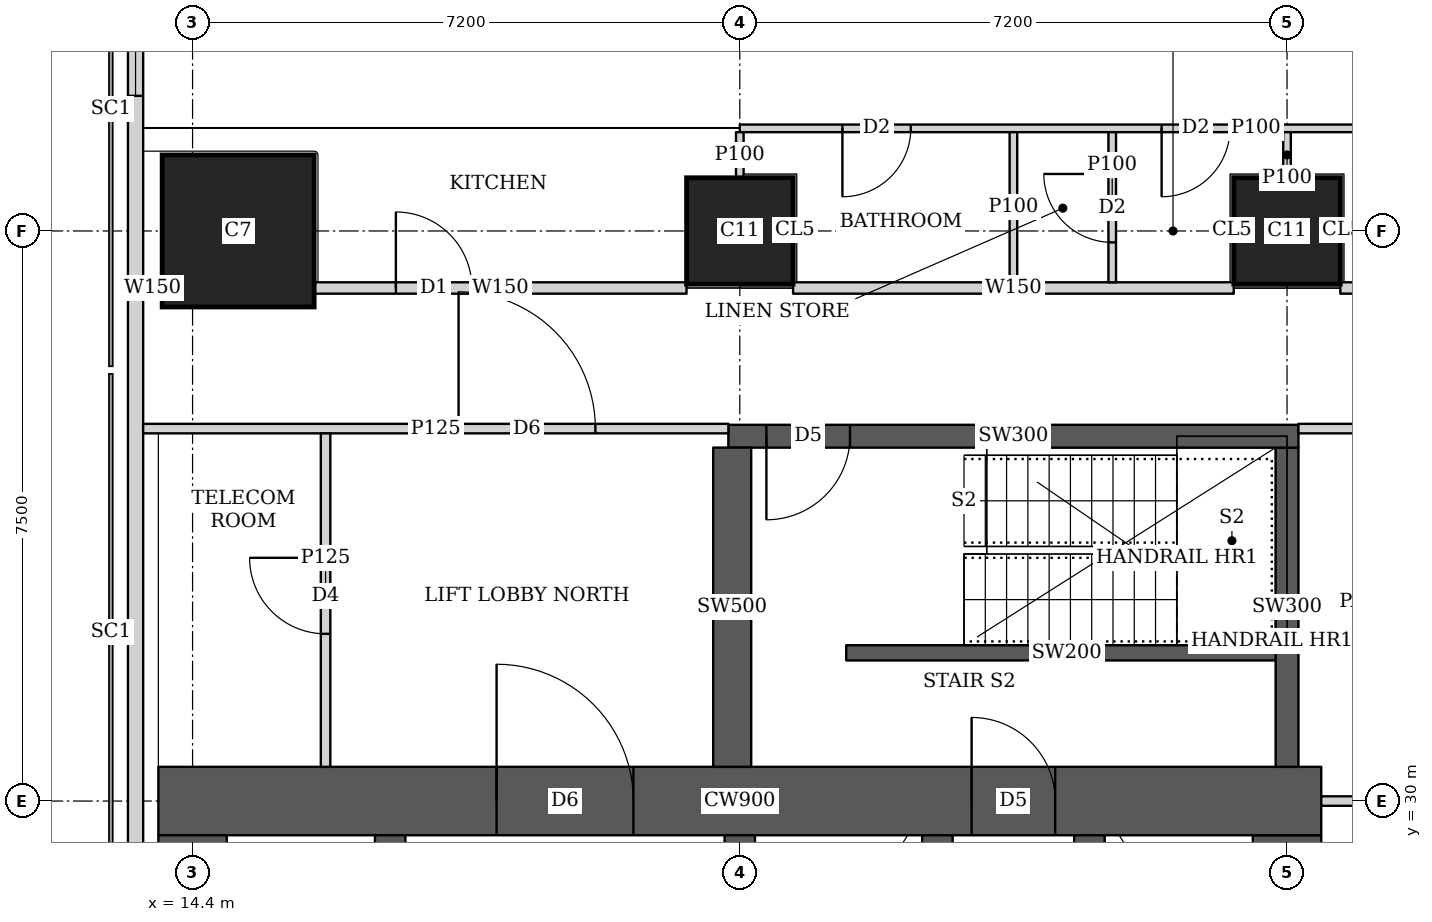
"""IFC4 building model, lengths in metres.
Left out: names, types, materials, properties, quantities, classifications, styles, units other than length and angle.
Written with IfcOpenShell. Run it as: python <this file> out.ifc"""

import sys

from ifc_helpers import new_model, si_unit, direction, frame, frame_2d, origin, origin_2d, place, context, subcontext, project, spatial, rectangle, extrude, element, fill, save


model = new_model("IFC4")
c1 = context("Model", 3, precision=1e-05, world=origin(), true_north=direction((0.0, 1.0)))
c2 = subcontext(c1, "Body", "Model", "MODEL_VIEW")
j1 = project(units=[si_unit("LENGTHUNIT", "METRE"), si_unit("PLANEANGLEUNIT", "RADIAN")], contexts=[c1])
p1 = place(None, origin())
s1 = spatial("IfcSite", under=j1, at=p1, CompositionType="ELEMENT")
p2 = place(p1, origin())
s2 = spatial("IfcBuilding", under=s1, at=p2, CompositionType="ELEMENT")
p3 = place(p2, frame((0.0, 0.0, 262.85)))
s3 = spatial("IfcBuildingStorey", under=s2, at=p3, CompositionType="ELEMENT", Elevation=262.85)
p4 = place(p3, frame((15.0, 37.5, 0.0), z_axis=(0.0, 0.0, 1.0), x_axis=(1.0, 0.0, 0.0)))
e1 = element("IfcColumn", 1, at=p4, inside=s3, PredefinedType="COLUMN", context=c2, shape_type="SweptSolid", body=[
    extrude(rectangle(XDim=2.0, YDim=2.0, at=origin_2d()), origin(), (0.0, 0.0, 1.0), 3.75),
])
for number, where, z_axis, x_axis in (
    (2, (21.6, 37.5, 0.0), (0.0, 0.0, 1.0), (1.0, 0.0, 0.0)),
    (3, (28.8, 37.5, 0.0), (0.0, 0.0, 1.0), (1.0, 0.0, 0.0)),
):
    element("IfcColumn", number, at=place(p3, frame(where, z_axis=z_axis, x_axis=x_axis)), inside=s3, PredefinedType="COLUMN", context=c2, shape_type="SweptSolid", body=[
        extrude(rectangle(XDim=1.4, YDim=1.4, at=origin_2d()), origin(), (0.0, 0.0, 1.0), 3.75),
    ])
p5 = place(p3, frame((13.95, 30.0, 0.0), z_axis=(0.0, 0.0, 1.0), x_axis=(1.0, 0.0, 0.0)))
e4 = element("IfcWall", 4, at=p5, inside=s3, PredefinedType="SHEAR", context=c2, shape_type="SweptSolid", body=[
    extrude(rectangle(XDim=15.3, YDim=0.9, at=frame_2d((7.65, 0.0))), origin(), (0.0, 0.0, 1.0), 3.75),
])
p6 = place(p5, frame((4.45, 0.0, 0.0)))
e5 = element("IfcOpeningElement", 5, at=p6, cuts=e4, PredefinedType="OPENING", context=c2, shape_type="SweptSolid", body=[
    extrude(rectangle(XDim=1.8, YDim=2.1, at=frame_2d((0.9, 1.05))), frame((0.0, 0.46, 0.0), z_axis=(0.0, -1.0, 0.0), x_axis=(1.0, 0.0, 0.0)), (0.0, 0.0, 1.0), 0.92),
])
p7 = place(p5, frame((10.7, 0.0, 0.0)))
e6 = element("IfcOpeningElement", 6, at=p7, cuts=e4, PredefinedType="OPENING", context=c2, shape_type="SweptSolid", body=[
    extrude(rectangle(XDim=1.1, YDim=2.1, at=frame_2d((0.55, 1.05))), frame((0.0, 0.46, 0.0), z_axis=(0.0, -1.0, 0.0), x_axis=(1.0, 0.0, 0.0)), (0.0, 0.0, 1.0), 0.92),
])
for number, where, z_axis, x_axis in (
    (7, (14.4, 15.45, 0.0), (0.0, 0.0, 1.0), (0.0, 1.0, 0.0)),
    (8, (28.8, 15.45, 0.0), (0.0, 0.0, 1.0), (0.0, 1.0, 0.0)),
):
    element("IfcWall", number, at=place(p3, frame(where, z_axis=z_axis, x_axis=x_axis)), inside=s3, PredefinedType="SHEAR", context=c2, shape_type="SweptSolid", body=[
        extrude(rectangle(XDim=14.1, YDim=0.9, at=frame_2d((7.05, 0.0))), origin(), (0.0, 0.0, 1.0), 3.75),
    ])
p8 = place(p3, frame((17.0, 15.45, 0.0), z_axis=(0.0, 0.0, 1.0), x_axis=(0.0, 1.0, 0.0)))
e9 = element("IfcWall", 9, at=p8, inside=s3, PredefinedType="SHEAR", context=c2, shape_type="SweptSolid", body=[
    extrude(rectangle(XDim=14.1, YDim=0.4, at=frame_2d((7.05, 0.0))), origin(), (0.0, 0.0, 1.0), 3.75),
])
p9 = place(p8, frame((1.05, 0.0, 0.0)))
e10 = element("IfcOpeningElement", 10, at=p9, cuts=e9, PredefinedType="OPENING", context=c2, shape_type="SweptSolid", body=[
    extrude(rectangle(XDim=1.0, YDim=2.1, at=frame_2d((0.5, 1.05))), frame((0.0, 0.21, 0.0), z_axis=(0.0, -1.0, 0.0), x_axis=(1.0, 0.0, 0.0)), (0.0, 0.0, 1.0), 0.42),
])
p10 = place(p8, frame((4.675, 0.0, 0.0)))
e11 = element("IfcOpeningElement", 11, at=p10, cuts=e9, PredefinedType="OPENING", context=c2, shape_type="SweptSolid", body=[
    extrude(rectangle(XDim=1.0, YDim=2.1, at=frame_2d((0.5, 1.05))), frame((0.0, 0.21, 0.0), z_axis=(0.0, -1.0, 0.0), x_axis=(1.0, 0.0, 0.0)), (0.0, 0.0, 1.0), 0.42),
])
p11 = place(p8, frame((8.425, 0.0, 0.0)))
e12 = element("IfcOpeningElement", 12, at=p11, cuts=e9, PredefinedType="OPENING", context=c2, shape_type="SweptSolid", body=[
    extrude(rectangle(XDim=1.0, YDim=2.1, at=frame_2d((0.5, 1.05))), frame((0.0, 0.21, 0.0), z_axis=(0.0, -1.0, 0.0), x_axis=(1.0, 0.0, 0.0)), (0.0, 0.0, 1.0), 0.42),
])
p12 = place(p8, frame((12.175, 0.0, 0.0)))
e13 = element("IfcOpeningElement", 13, at=p12, cuts=e9, PredefinedType="OPENING", context=c2, shape_type="SweptSolid", body=[
    extrude(rectangle(XDim=1.0, YDim=2.1, at=frame_2d((0.5, 1.05))), frame((0.0, 0.21, 0.0), z_axis=(0.0, -1.0, 0.0), x_axis=(1.0, 0.0, 0.0)), (0.0, 0.0, 1.0), 0.42),
])
p13 = place(p3, frame((21.6, 15.45, 0.0), z_axis=(0.0, 0.0, 1.0), x_axis=(0.0, 1.0, 0.0)))
e14 = element("IfcWall", 14, at=p13, inside=s3, PredefinedType="SHEAR", context=c2, shape_type="SweptSolid", body=[
    extrude(rectangle(XDim=14.1, YDim=0.4, at=frame_2d((7.05, 0.0))), origin(), (0.0, 0.0, 1.0), 3.75),
])
p14 = place(p13, frame((0.875, 0.0, 0.0)))
e15 = element("IfcOpeningElement", 15, at=p14, cuts=e14, PredefinedType="OPENING", context=c2, shape_type="SweptSolid", body=[
    extrude(rectangle(XDim=1.1, YDim=2.1, at=frame_2d((0.55, 1.05))), frame((0.0, 0.21, 0.0), z_axis=(0.0, -1.0, 0.0), x_axis=(1.0, 0.0, 0.0)), (0.0, 0.0, 1.0), 0.42),
])
p15 = place(p13, frame((4.625, 0.0, 0.0)))
e16 = element("IfcOpeningElement", 16, at=p15, cuts=e14, PredefinedType="OPENING", context=c2, shape_type="SweptSolid", body=[
    extrude(rectangle(XDim=1.1, YDim=2.1, at=frame_2d((0.55, 1.05))), frame((0.0, 0.21, 0.0), z_axis=(0.0, -1.0, 0.0), x_axis=(1.0, 0.0, 0.0)), (0.0, 0.0, 1.0), 0.42),
])
p16 = place(p13, frame((8.375, 0.0, 0.0)))
e17 = element("IfcOpeningElement", 17, at=p16, cuts=e14, PredefinedType="OPENING", context=c2, shape_type="SweptSolid", body=[
    extrude(rectangle(XDim=1.1, YDim=2.1, at=frame_2d((0.55, 1.05))), frame((0.0, 0.21, 0.0), z_axis=(0.0, -1.0, 0.0), x_axis=(1.0, 0.0, 0.0)), (0.0, 0.0, 1.0), 0.42),
])
p17 = place(p13, frame((12.125, 0.0, 0.0)))
e18 = element("IfcOpeningElement", 18, at=p17, cuts=e14, PredefinedType="OPENING", context=c2, shape_type="SweptSolid", body=[
    extrude(rectangle(XDim=1.1, YDim=2.1, at=frame_2d((0.55, 1.05))), frame((0.0, 0.21, 0.0), z_axis=(0.0, -1.0, 0.0), x_axis=(1.0, 0.0, 0.0)), (0.0, 0.0, 1.0), 0.42),
])
p18 = place(p3, frame((24.2, 15.45, 0.0), z_axis=(0.0, 0.0, 1.0), x_axis=(0.0, 1.0, 0.0)))
e19 = element("IfcWall", 19, at=p18, inside=s3, PredefinedType="SHEAR", context=c2, shape_type="SweptSolid", body=[
    extrude(rectangle(XDim=14.1, YDim=0.4, at=frame_2d((7.05, 0.0))), origin(), (0.0, 0.0, 1.0), 3.75),
])
p19 = place(p3, frame((26.2, 26.45, 0.0), z_axis=(0.0, 0.0, 1.0), x_axis=(0.0, 1.0, 0.0)))
e20 = element("IfcWall", 20, at=p19, inside=s3, PredefinedType="SHEAR", context=c2, shape_type="SweptSolid", body=[
    extrude(rectangle(XDim=3.1, YDim=0.4, at=frame_2d((1.55, 0.0))), origin(), (0.0, 0.0, 1.0), 3.75),
])
p20 = place(p19, frame((1.075, 0.0, 0.0)))
e21 = element("IfcOpeningElement", 21, at=p20, cuts=e20, PredefinedType="OPENING", context=c2, shape_type="SweptSolid", body=[
    extrude(rectangle(XDim=1.2, YDim=2.1, at=frame_2d((0.6, 1.05))), frame((0.0, 0.21, 0.0), z_axis=(0.0, -1.0, 0.0), x_axis=(1.0, 0.0, 0.0)), (0.0, 0.0, 1.0), 0.42),
])
p21 = place(p3, frame((21.45, 34.8, 0.0), z_axis=(0.0, 0.0, 1.0), x_axis=(1.0, 0.0, 0.0)))
e22 = element("IfcWall", 22, at=p21, inside=s3, PredefinedType="SHEAR", context=c2, shape_type="SweptSolid", body=[
    extrude(rectangle(XDim=7.5, YDim=0.3, at=frame_2d((3.75, 0.0))), origin(), (0.0, 0.0, 1.0), 3.75),
])
p22 = place(p21, frame((0.5, 0.0, 0.0)))
e23 = element("IfcOpeningElement", 23, at=p22, cuts=e22, PredefinedType="OPENING", context=c2, shape_type="SweptSolid", body=[
    extrude(rectangle(XDim=1.1, YDim=2.1, at=frame_2d((0.55, 1.05))), frame((0.0, 0.16, 0.0), z_axis=(0.0, -1.0, 0.0), x_axis=(1.0, 0.0, 0.0)), (0.0, 0.0, 1.0), 0.32),
])
p23 = place(p3, frame((21.5, 30.45, 0.0), z_axis=(0.0, 0.0, 1.0), x_axis=(0.0, 1.0, 0.0)))
e24 = element("IfcWall", 24, at=p23, inside=s3, PredefinedType="SHEAR", context=c2, shape_type="SweptSolid", body=[
    extrude(rectangle(XDim=4.2, YDim=0.5, at=frame_2d((2.1, 0.0))), origin(), (0.0, 0.0, 1.0), 3.75),
])
p24 = place(p3, frame((28.8, 30.45, 0.0), z_axis=(0.0, 0.0, 1.0), x_axis=(0.0, 1.0, 0.0)))
e25 = element("IfcWall", 25, at=p24, inside=s3, PredefinedType="SHEAR", context=c2, shape_type="SweptSolid", body=[
    extrude(rectangle(XDim=4.2, YDim=0.3, at=frame_2d((2.1, 0.0))), origin(), (0.0, 0.0, 1.0), 3.75),
])
p25 = place(p3, frame((13.65, 43.037, 0.0), z_axis=(0.0, 0.0, 1.0), x_axis=(0.0, -1.0, 0.0)))
e26 = element("IfcWall", 26, at=p25, inside=s3, PredefinedType="SOLIDWALL", context=c2, shape_type="SweptSolid", body=[
    extrude(rectangle(XDim=35.374, YDim=0.2, at=frame_2d((17.687, 0.0))), origin(), (0.0, 0.0, 1.0), 3.5),
])
p26 = place(p25, frame((1.959, 0.0, 0.9)))
e27 = element("IfcOpeningElement", 27, at=p26, cuts=e26, PredefinedType="OPENING", context=c2, shape_type="SweptSolid", body=[
    extrude(rectangle(XDim=1.8, YDim=1.5, at=frame_2d((0.9, 0.75))), frame((0.0, 0.11, 0.0), z_axis=(0.0, -1.0, 0.0), x_axis=(1.0, 0.0, 0.0)), (0.0, 0.0, 1.0), 0.22),
])
p27 = place(p3, frame((13.75, 36.75, 0.0), z_axis=(0.0, 0.0, 1.0), x_axis=(1.0, 0.0, 0.0)))
e28 = element("IfcWall", 28, at=p27, inside=s3, PredefinedType="SOLIDWALL", context=c2, shape_type="SweptSolid", body=[
    extrude(rectangle(XDim=0.249, YDim=0.15, at=frame_2d((0.125, 0.0))), origin(), (0.0, 0.0, 1.0), 3.5),
])
p28 = place(p3, frame((16.001, 36.75, 0.0), z_axis=(0.0, 0.0, 1.0), x_axis=(1.0, 0.0, 0.0)))
e29 = element("IfcWall", 29, at=p28, inside=s3, PredefinedType="SOLIDWALL", context=c2, shape_type="SweptSolid", body=[
    extrude(rectangle(XDim=4.898, YDim=0.15, at=frame_2d((2.449, 0.0))), origin(), (0.0, 0.0, 1.0), 3.5),
])
p29 = place(p28, frame((1.074, 0.0, 0.0)))
e30 = element("IfcOpeningElement", 30, at=p29, cuts=e29, PredefinedType="OPENING", context=c2, shape_type="SweptSolid", body=[
    extrude(rectangle(XDim=1.0, YDim=2.1, at=frame_2d((0.5, 1.05))), frame((0.0, 0.085, 0.0), z_axis=(0.0, -1.0, 0.0), x_axis=(1.0, 0.0, 0.0)), (0.0, 0.0, 1.0), 0.17),
])
p30 = place(p3, frame((22.301, 36.75, 0.0), z_axis=(0.0, 0.0, 1.0), x_axis=(1.0, 0.0, 0.0)))
e31 = element("IfcWall", 31, at=p30, inside=s3, PredefinedType="SOLIDWALL", context=c2, shape_type="SweptSolid", body=[
    extrude(rectangle(XDim=5.798, YDim=0.15, at=frame_2d((2.899, 0.0))), origin(), (0.0, 0.0, 1.0), 3.5),
])
p31 = place(p3, frame((29.501, 36.75, 0.0), z_axis=(0.0, 0.0, 1.0), x_axis=(1.0, 0.0, 0.0)))
e32 = element("IfcWall", 32, at=p31, inside=s3, PredefinedType="SOLIDWALL", context=c2, shape_type="SweptSolid", body=[
    extrude(rectangle(XDim=5.471, YDim=0.15, at=frame_2d((2.735, 0.0))), origin(), (0.0, 0.0, 1.0), 3.5),
])
p32 = place(p3, frame((21.6, 38.85, 0.0), z_axis=(0.0, 0.0, 1.0), x_axis=(1.0, 0.0, 0.0)))
e33 = element("IfcWall", 33, at=p32, inside=s3, PredefinedType="PARTITIONING", context=c2, shape_type="SweptSolid", body=[
    extrude(rectangle(XDim=12.981, YDim=0.1, at=frame_2d((6.49, 0.0))), origin(), (0.0, 0.0, 1.0), 3.5),
])
p33 = place(p32, frame((1.35, 0.0, 0.0)))
e34 = element("IfcOpeningElement", 34, at=p33, cuts=e33, PredefinedType="OPENING", context=c2, shape_type="SweptSolid", body=[
    extrude(rectangle(XDim=0.9, YDim=2.1, at=frame_2d((0.45, 1.05))), frame((0.0, 0.06, 0.0), z_axis=(0.0, -1.0, 0.0), x_axis=(1.0, 0.0, 0.0)), (0.0, 0.0, 1.0), 0.12),
])
p34 = place(p32, frame((5.55, 0.0, 0.0)))
e35 = element("IfcOpeningElement", 35, at=p34, cuts=e33, PredefinedType="OPENING", context=c2, shape_type="SweptSolid", body=[
    extrude(rectangle(XDim=0.9, YDim=2.1, at=frame_2d((0.45, 1.05))), frame((0.0, 0.06, 0.0), z_axis=(0.0, -1.0, 0.0), x_axis=(1.0, 0.0, 0.0)), (0.0, 0.0, 1.0), 0.12),
])
p35 = place(p32, frame((8.55, 0.0, 0.0)))
e36 = element("IfcOpeningElement", 36, at=p35, cuts=e33, PredefinedType="OPENING", context=c2, shape_type="SweptSolid", body=[
    extrude(rectangle(XDim=0.9, YDim=2.1, at=frame_2d((0.45, 1.05))), frame((0.0, 0.06, 0.0), z_axis=(0.0, -1.0, 0.0), x_axis=(1.0, 0.0, 0.0)), (0.0, 0.0, 1.0), 0.12),
])
p36 = place(p32, frame((11.681, 0.0, 0.0)))
e37 = element("IfcOpeningElement", 37, at=p36, cuts=e33, PredefinedType="OPENING", context=c2, shape_type="SweptSolid", body=[
    extrude(rectangle(XDim=0.9, YDim=2.1, at=frame_2d((0.45, 1.05))), frame((0.0, 0.06, 0.0), z_axis=(0.0, -1.0, 0.0), x_axis=(1.0, 0.0, 0.0)), (0.0, 0.0, 1.0), 0.12),
])
p37 = place(p3, frame((21.6, 38.201, 0.0), z_axis=(0.0, 0.0, 1.0), x_axis=(0.0, 1.0, 0.0)))
e38 = element("IfcWall", 38, at=p37, inside=s3, PredefinedType="PARTITIONING", context=c2, shape_type="SweptSolid", body=[
    extrude(rectangle(XDim=0.599, YDim=0.1, at=frame_2d((0.3, 0.0))), origin(), (0.0, 0.0, 1.0), 3.5),
])
p38 = place(p3, frame((25.2, 36.825, 0.0), z_axis=(0.0, 0.0, 1.0), x_axis=(0.0, 1.0, 0.0)))
e39 = element("IfcWall", 39, at=p38, inside=s3, PredefinedType="PARTITIONING", context=c2, shape_type="SweptSolid", body=[
    extrude(rectangle(XDim=1.975, YDim=0.1, at=frame_2d((0.988, 0.0))), origin(), (0.0, 0.0, 1.0), 3.5),
])
p39 = place(p3, frame((28.8, 38.201, 0.0), z_axis=(0.0, 0.0, 1.0), x_axis=(0.0, 1.0, 0.0)))
e40 = element("IfcWall", 40, at=p39, inside=s3, PredefinedType="PARTITIONING", context=c2, shape_type="SweptSolid", body=[
    extrude(rectangle(XDim=0.599, YDim=0.1, at=frame_2d((0.3, 0.0))), origin(), (0.0, 0.0, 1.0), 3.5),
])
p40 = place(p3, frame((26.5, 36.825, 0.0), z_axis=(0.0, 0.0, 1.0), x_axis=(0.0, 1.0, 0.0)))
e41 = element("IfcWall", 41, at=p40, inside=s3, PredefinedType="PARTITIONING", context=c2, shape_type="SweptSolid", body=[
    extrude(rectangle(XDim=1.975, YDim=0.1, at=frame_2d((0.988, 0.0))), origin(), (0.0, 0.0, 1.0), 3.5),
])
p41 = place(p40, frame((0.525, 0.0, 0.0)))
e42 = element("IfcOpeningElement", 42, at=p41, cuts=e41, PredefinedType="OPENING", context=c2, shape_type="SweptSolid", body=[
    extrude(rectangle(XDim=0.9, YDim=2.1, at=frame_2d((0.45, 1.05))), frame((0.0, 0.06, 0.0), z_axis=(0.0, -1.0, 0.0), x_axis=(1.0, 0.0, 0.0)), (0.0, 0.0, 1.0), 0.12),
])
p42 = place(p3, frame((13.75, 34.9, 0.0), z_axis=(0.0, 0.0, 1.0), x_axis=(1.0, 0.0, 0.0)))
e43 = element("IfcWall", 43, at=p42, inside=s3, PredefinedType="PARTITIONING", context=c2, shape_type="SweptSolid", body=[
    extrude(rectangle(XDim=7.7, YDim=0.125, at=frame_2d((3.85, 0.0))), origin(), (0.0, 0.0, 1.0), 3.5),
])
p43 = place(p42, frame((4.15, 0.0, 0.0)))
e44 = element("IfcOpeningElement", 44, at=p43, cuts=e43, PredefinedType="OPENING", context=c2, shape_type="SweptSolid", body=[
    extrude(rectangle(XDim=1.8, YDim=2.1, at=frame_2d((0.9, 1.05))), frame((0.0, 0.073, 0.0), z_axis=(0.0, -1.0, 0.0), x_axis=(1.0, 0.0, 0.0)), (0.0, 0.0, 1.0), 0.145),
])
p44 = place(p3, frame((16.15, 30.45, 0.0), z_axis=(0.0, 0.0, 1.0), x_axis=(0.0, 1.0, 0.0)))
e45 = element("IfcWall", 45, at=p44, inside=s3, PredefinedType="PARTITIONING", context=c2, shape_type="SweptSolid", body=[
    extrude(rectangle(XDim=4.387, YDim=0.125, at=frame_2d((2.193, 0.0))), origin(), (0.0, 0.0, 1.0), 3.5),
])
p45 = place(p44, frame((1.75, 0.0, 0.0)))
e46 = element("IfcOpeningElement", 46, at=p45, cuts=e45, PredefinedType="OPENING", context=c2, shape_type="SweptSolid", body=[
    extrude(rectangle(XDim=1.0, YDim=2.1, at=frame_2d((0.5, 1.05))), frame((0.0, 0.073, 0.0), z_axis=(0.0, -1.0, 0.0), x_axis=(1.0, 0.0, 0.0)), (0.0, 0.0, 1.0), 0.145),
])
p46 = place(p3, frame((28.95, 34.9, 0.0), z_axis=(0.0, 0.0, 1.0), x_axis=(1.0, 0.0, 0.0)))
e47 = element("IfcWall", 47, at=p46, inside=s3, PredefinedType="PARTITIONING", context=c2, shape_type="SweptSolid", body=[
    extrude(rectangle(XDim=4.588, YDim=0.125, at=frame_2d((2.294, 0.0))), origin(), (0.0, 0.0, 1.0), 3.5),
])
p47 = place(p3, frame((29.25, 30.0, 0.0), z_axis=(0.0, 0.0, 1.0), x_axis=(1.0, 0.0, 0.0)))
e48 = element("IfcWall", 48, at=p47, inside=s3, PredefinedType="PARTITIONING", context=c2, shape_type="SweptSolid", body=[
    extrude(rectangle(XDim=3.049, YDim=0.125, at=frame_2d((1.524, 0.0))), origin(), (0.0, 0.0, 1.0), 3.5),
])
p48 = place(p3, frame((23.0, 31.95, 0.0), z_axis=(0.0, 0.0, 1.0), x_axis=(1.0, 0.0, 0.0)))
e49 = element("IfcWall", 49, at=p48, inside=s3, PredefinedType="SHEAR", context=c2, shape_type="SweptSolid", body=[
    extrude(rectangle(XDim=5.8, YDim=0.2, at=frame_2d((2.9, 0.0))), origin(), (0.0, 0.0, 1.0), 3.75),
])
p49 = place(p26, origin())
e50 = element("IfcWindow", 50, at=p49, inside=s3, PartitioningType="SINGLE_PANEL", PredefinedType="WINDOW", context=c2, shape_type="SweptSolid", body=[
    extrude(rectangle(XDim=1.8, YDim=1.5, at=frame_2d((0.9, 0.75))), frame((0.0, 0.03, 0.0), z_axis=(0.0, -1.0, 0.0), x_axis=(1.0, 0.0, 0.0)), (0.0, 0.0, 1.0), 0.06),
])
fill(e27, e50)
p50 = place(p33, origin())
e51 = element("IfcDoor", 51, at=p50, inside=s3, OperationType="SINGLE_SWING_RIGHT", PredefinedType="DOOR", context=c2, shape_type="SweptSolid", body=[
    extrude(rectangle(XDim=0.9, YDim=2.1, at=frame_2d((0.45, 1.05))), frame((0.0, 0.025, 0.0), z_axis=(0.0, -1.0, 0.0), x_axis=(1.0, 0.0, 0.0)), (0.0, 0.0, 1.0), 0.05),
])
fill(e34, e51)
p51 = place(p34, origin())
e52 = element("IfcDoor", 52, at=p51, inside=s3, OperationType="SINGLE_SWING_RIGHT", PredefinedType="DOOR", context=c2, shape_type="SweptSolid", body=[
    extrude(rectangle(XDim=0.9, YDim=2.1, at=frame_2d((0.45, 1.05))), frame((0.0, 0.025, 0.0), z_axis=(0.0, -1.0, 0.0), x_axis=(1.0, 0.0, 0.0)), (0.0, 0.0, 1.0), 0.05),
])
fill(e35, e52)
p52 = place(p41, origin())
e53 = element("IfcDoor", 53, at=p52, inside=s3, OperationType="SINGLE_SWING_RIGHT", PredefinedType="DOOR", context=c2, shape_type="SweptSolid", body=[
    extrude(rectangle(XDim=0.9, YDim=2.1, at=frame_2d((0.45, 1.05))), frame((0.0, 0.025, 0.0), z_axis=(0.0, -1.0, 0.0), x_axis=(1.0, 0.0, 0.0)), (0.0, 0.0, 1.0), 0.05),
])
fill(e42, e53)
p53 = place(p29, origin())
e54 = element("IfcDoor", 54, at=p53, inside=s3, OperationType="SINGLE_SWING_LEFT", PredefinedType="DOOR", context=c2, shape_type="SweptSolid", body=[
    extrude(rectangle(XDim=1.0, YDim=2.1, at=frame_2d((0.5, 1.05))), frame((0.0, 0.025, 0.0), z_axis=(0.0, -1.0, 0.0), x_axis=(1.0, 0.0, 0.0)), (0.0, 0.0, 1.0), 0.05),
])
fill(e30, e54)
p54 = place(p45, origin())
e55 = element("IfcDoor", 55, at=p54, inside=s3, OperationType="SINGLE_SWING_RIGHT", PredefinedType="DOOR", context=c2, shape_type="SweptSolid", body=[
    extrude(rectangle(XDim=1.0, YDim=2.1, at=frame_2d((0.5, 1.05))), frame((0.0, 0.025, 0.0), z_axis=(0.0, -1.0, 0.0), x_axis=(1.0, 0.0, 0.0)), (0.0, 0.0, 1.0), 0.05),
])
fill(e46, e55)
p55 = place(p43, origin())
e56 = element("IfcDoor", 56, at=p55, inside=s3, OperationType="DOUBLE_DOOR_SINGLE_SWING", PredefinedType="DOOR", context=c2, shape_type="SweptSolid", body=[
    extrude(rectangle(XDim=1.8, YDim=2.1, at=frame_2d((0.9, 1.05))), frame((0.0, 0.025, 0.0), z_axis=(0.0, -1.0, 0.0), x_axis=(1.0, 0.0, 0.0)), (0.0, 0.0, 1.0), 0.05),
])
fill(e44, e56)
p56 = place(p6, origin())
e57 = element("IfcDoor", 57, at=p56, inside=s3, OperationType="DOUBLE_DOOR_SINGLE_SWING", PredefinedType="DOOR", context=c2, shape_type="SweptSolid", body=[
    extrude(rectangle(XDim=1.8, YDim=2.1, at=frame_2d((0.9, 1.05))), frame((0.0, 0.025, 0.0), z_axis=(0.0, -1.0, 0.0), x_axis=(1.0, 0.0, 0.0)), (0.0, 0.0, 1.0), 0.05),
])
fill(e5, e57)
p57 = place(p7, origin())
e58 = element("IfcDoor", 58, at=p57, inside=s3, OperationType="SINGLE_SWING_LEFT", PredefinedType="DOOR", context=c2, shape_type="SweptSolid", body=[
    extrude(rectangle(XDim=1.1, YDim=2.1, at=frame_2d((0.55, 1.05))), frame((0.0, 0.025, 0.0), z_axis=(0.0, -1.0, 0.0), x_axis=(1.0, 0.0, 0.0)), (0.0, 0.0, 1.0), 0.05),
])
fill(e6, e58)
p58 = place(p22, origin())
e59 = element("IfcDoor", 59, at=p58, inside=s3, OperationType="SINGLE_SWING_RIGHT", PredefinedType="DOOR", context=c2, shape_type="SweptSolid", body=[
    extrude(rectangle(XDim=1.1, YDim=2.1, at=frame_2d((0.55, 1.05))), frame((0.0, 0.025, 0.0), z_axis=(0.0, -1.0, 0.0), x_axis=(1.0, 0.0, 0.0)), (0.0, 0.0, 1.0), 0.05),
])
fill(e23, e59)
save(model, sys.argv[1])
